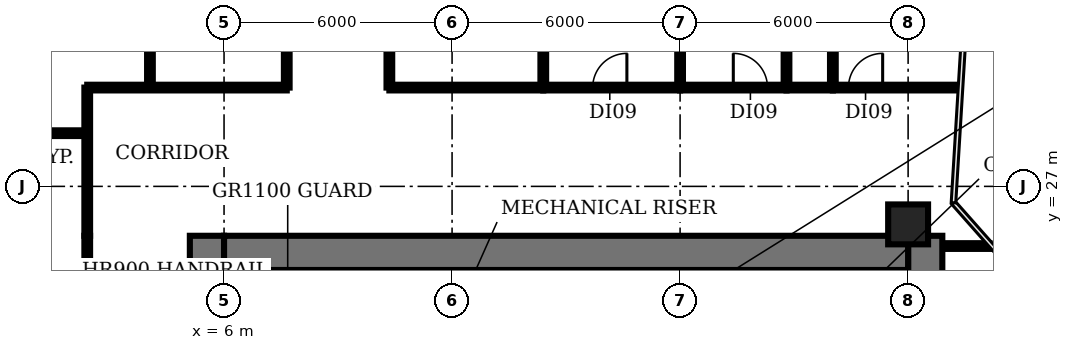
"""IFC4 building model, lengths in metres.
Left out: names, types, materials, properties, quantities, classifications, styles, units other than length and angle.
Written with IfcOpenShell. Run it as: python <this file> out.ifc"""

import sys

from ifc_helpers import new_model, si_unit, direction, frame, frame_2d, origin, origin_2d, place, context, subcontext, project, spatial, rectangle, circle, extrude, element, fill, save


model = new_model("IFC4")
c1 = context("Model", 3, precision=1e-05, world=origin(), true_north=direction((0.0, 1.0)))
c2 = subcontext(c1, "Body", "Model", "MODEL_VIEW")
j1 = project(units=[si_unit("LENGTHUNIT", "METRE"), si_unit("PLANEANGLEUNIT", "RADIAN")], contexts=[c1])
p1 = place(None, origin())
s1 = spatial("IfcSite", under=j1, at=p1, CompositionType="ELEMENT")
p2 = place(p1, origin())
s2 = spatial("IfcBuilding", under=s1, at=p2, CompositionType="ELEMENT")
p3 = place(p2, frame((0.0, 0.0, 37.4)))
s3 = spatial("IfcBuildingStorey", under=s2, at=p3, CompositionType="ELEMENT", Elevation=37.4)
p4 = place(p3, frame((24.0, 26.0, 0.0), z_axis=(0.0, 0.0, 1.0), x_axis=(1.0, 0.0, 0.0)))
e1 = element("IfcColumn", 1, at=p4, inside=s3, PredefinedType="COLUMN", context=c2, shape_type="SweptSolid", body=[
    extrude(circle(Radius=0.525, at=origin_2d()), origin(), (0.0, 0.0, 1.0), 3.85),
])
p5 = place(p3, frame((9.275, 18.375, 0.0), z_axis=(0.0, 0.0, 1.0), x_axis=(0.0, 1.0, 0.0)))
e2 = element("IfcWall", 2, at=p5, inside=s3, PredefinedType="SHEAR", context=c2, shape_type="SweptSolid", body=[
    extrude(rectangle(XDim=6.425, YDim=0.25, at=frame_2d((3.212, 0.0))), origin(), (0.0, 0.0, 1.0), 3.85),
])
for number, where, z_axis, x_axis in (
    (3, (15.1, 22.9, 0.0), (0.0, 0.0, 1.0), (0.0, 1.0, 0.0)),
    (4, (20.7, 22.9, 0.0), (0.0, 0.0, 1.0), (0.0, 1.0, 0.0)),
):
    element("IfcWall", number, at=place(p3, frame(where, z_axis=z_axis, x_axis=x_axis)), inside=s3, PredefinedType="SHEAR", context=c2, shape_type="SweptSolid", body=[
        extrude(rectangle(XDim=1.9, YDim=0.2, at=frame_2d((0.95, 0.0))), origin(), (0.0, 0.0, 1.0), 3.85),
    ])
p6 = place(p3, frame((5.55, 4.5, 0.0), z_axis=(0.0, 0.0, 1.0), x_axis=(0.0, 1.0, 0.0)))
e5 = element("IfcWall", 5, at=p6, inside=s3, PredefinedType="SHEAR", context=c2, shape_type="SweptSolid", body=[
    extrude(rectangle(XDim=21.2, YDim=0.9, at=frame_2d((10.6, 0.0))), origin(), (0.0, 0.0, 1.0), 3.85),
])
p7 = place(p6, frame((1.15, 0.0, 0.0)))
e6 = element("IfcOpeningElement", 6, at=p7, cuts=e5, PredefinedType="OPENING", context=c2, shape_type="SweptSolid", body=[
    extrude(rectangle(XDim=1.5, YDim=2.1, at=frame_2d((0.75, 1.05))), frame((0.0, 0.46, 0.0), z_axis=(0.0, -1.0, 0.0), x_axis=(1.0, 0.0, 0.0)), (0.0, 0.0, 1.0), 0.92),
])
p8 = place(p6, frame((7.6, 0.0, 0.0)))
e7 = element("IfcOpeningElement", 7, at=p8, cuts=e5, PredefinedType="OPENING", context=c2, shape_type="SweptSolid", body=[
    extrude(rectangle(XDim=1.2, YDim=2.1, at=frame_2d((0.6, 1.05))), frame((0.0, 0.46, 0.0), z_axis=(0.0, -1.0, 0.0), x_axis=(1.0, 0.0, 0.0)), (0.0, 0.0, 1.0), 0.92),
])
p9 = place(p6, frame((14.15, 0.0, 0.0)))
e8 = element("IfcOpeningElement", 8, at=p9, cuts=e5, PredefinedType="OPENING", context=c2, shape_type="SweptSolid", body=[
    extrude(rectangle(XDim=1.2, YDim=2.1, at=frame_2d((0.6, 1.05))), frame((0.0, 0.46, 0.0), z_axis=(0.0, -1.0, 0.0), x_axis=(1.0, 0.0, 0.0)), (0.0, 0.0, 1.0), 0.92),
])
p10 = place(p3, frame((24.45, 25.7, 0.0), z_axis=(0.0, 0.0, 1.0), x_axis=(0.0, -1.0, 0.0)))
e9 = element("IfcWall", 9, at=p10, inside=s3, PredefinedType="SHEAR", context=c2, shape_type="SweptSolid", body=[
    extrude(rectangle(XDim=21.2, YDim=0.9, at=frame_2d((10.6, 0.0))), origin(), (0.0, 0.0, 1.0), 3.85),
])
p11 = place(p10, frame((18.55, 0.0, 0.0)))
e10 = element("IfcOpeningElement", 10, at=p11, cuts=e9, PredefinedType="OPENING", context=c2, shape_type="SweptSolid", body=[
    extrude(rectangle(XDim=1.5, YDim=2.1, at=frame_2d((0.75, 1.05))), frame((0.0, 0.46, 0.0), z_axis=(0.0, -1.0, 0.0), x_axis=(1.0, 0.0, 0.0)), (0.0, 0.0, 1.0), 0.92),
])
p12 = place(p10, frame((12.45, 0.0, 0.0)))
e11 = element("IfcOpeningElement", 11, at=p12, cuts=e9, PredefinedType="OPENING", context=c2, shape_type="SweptSolid", body=[
    extrude(rectangle(XDim=0.9, YDim=2.1, at=frame_2d((0.45, 1.05))), frame((0.0, 0.46, 0.0), z_axis=(0.0, -1.0, 0.0), x_axis=(1.0, 0.0, 0.0)), (0.0, 0.0, 1.0), 0.92),
])
p13 = place(p10, frame((6.45, 0.0, 0.0)))
e12 = element("IfcOpeningElement", 12, at=p13, cuts=e9, PredefinedType="OPENING", context=c2, shape_type="SweptSolid", body=[
    extrude(rectangle(XDim=2.0, YDim=2.1, at=frame_2d((1.0, 1.05))), frame((0.0, 0.46, 0.0), z_axis=(0.0, -1.0, 0.0), x_axis=(1.0, 0.0, 0.0)), (0.0, 0.0, 1.0), 0.92),
])
p14 = place(p3, frame((6.0, 25.25, 0.0), z_axis=(0.0, 0.0, 1.0), x_axis=(1.0, 0.0, 0.0)))
e13 = element("IfcWall", 13, at=p14, inside=s3, PredefinedType="SHEAR", context=c2, shape_type="SweptSolid", body=[
    extrude(rectangle(XDim=18.0, YDim=0.9, at=frame_2d((9.0, 0.0))), origin(), (0.0, 0.0, 1.0), 3.85),
])
p15 = place(p3, frame((-1.01, 28.4, 0.0), z_axis=(0.0, 0.0, 1.0), x_axis=(1.0, 0.0, 0.0)))
e14 = element("IfcWall", 14, at=p15, inside=s3, PredefinedType="PARTITIONING", context=c2, shape_type="SweptSolid", body=[
    extrude(rectangle(XDim=3.41, YDim=0.15, at=frame_2d((1.705, 0.0))), origin(), (0.0, 0.0, 1.0), 2.83),
])
p16 = place(p3, frame((2.4, 4.5, 0.0), z_axis=(0.0, 0.0, 1.0), x_axis=(0.0, 1.0, 0.0)))
e15 = element("IfcWall", 15, at=p16, inside=s3, PredefinedType="PARTITIONING", context=c2, shape_type="SweptSolid", body=[
    extrude(rectangle(XDim=21.2, YDim=0.15, at=frame_2d((10.6, 0.0))), origin(), (0.0, 0.0, 1.0), 2.83),
])
p17 = place(p16, frame((10.8, 0.0, 0.0)))
e16 = element("IfcOpeningElement", 16, at=p17, cuts=e15, PredefinedType="OPENING", context=c2, shape_type="SweptSolid", body=[
    extrude(rectangle(XDim=1.2, YDim=2.1, at=frame_2d((0.6, 1.05))), frame((0.0, 0.085, 0.0), z_axis=(0.0, -1.0, 0.0), x_axis=(1.0, 0.0, 0.0)), (0.0, 0.0, 1.0), 0.17),
])
p18 = place(p3, frame((2.4, 25.7, 0.0), z_axis=(0.0, 0.0, 1.0), x_axis=(0.0, 1.0, 0.0)))
e17 = element("IfcWall", 17, at=p18, inside=s3, PredefinedType="PARTITIONING", context=c2, shape_type="SweptSolid", body=[
    extrude(rectangle(XDim=3.9, YDim=0.15, at=frame_2d((1.95, 0.0))), origin(), (0.0, 0.0, 1.0), 2.83),
])
p19 = place(p3, frame((2.4, 29.6, 0.0), z_axis=(0.0, 0.0, 1.0), x_axis=(1.0, 0.0, 0.0)))
e18 = element("IfcWall", 18, at=p19, inside=s3, PredefinedType="PARTITIONING", context=c2, shape_type="SweptSolid", body=[
    extrude(rectangle(XDim=5.25, YDim=0.15, at=frame_2d((2.625, 0.0))), origin(), (0.0, 0.0, 1.0), 2.83),
])
p20 = place(p3, frame((4.05, 29.6, 0.0), z_axis=(0.0, 0.0, 1.0), x_axis=(0.0, 1.0, 0.0)))
e19 = element("IfcWall", 19, at=p20, inside=s3, PredefinedType="PARTITIONING", context=c2, shape_type="SweptSolid", body=[
    extrude(rectangle(XDim=4.8, YDim=0.15, at=frame_2d((2.4, 0.0))), origin(), (0.0, 0.0, 1.0), 2.83),
])
p21 = place(p3, frame((7.65, 29.6, 0.0), z_axis=(0.0, 0.0, 1.0), x_axis=(0.0, 1.0, 0.0)))
e20 = element("IfcWall", 20, at=p21, inside=s3, PredefinedType="PARTITIONING", context=c2, shape_type="SweptSolid", body=[
    extrude(rectangle(XDim=4.8, YDim=0.15, at=frame_2d((2.4, 0.0))), origin(), (0.0, 0.0, 1.0), 2.83),
])
p22 = place(p21, frame((3.7, 0.0, 0.0)))
e21 = element("IfcOpeningElement", 21, at=p22, cuts=e20, PredefinedType="OPENING", context=c2, shape_type="SweptSolid", body=[
    extrude(rectangle(XDim=0.9, YDim=2.1, at=frame_2d((0.45, 1.05))), frame((0.0, 0.085, 0.0), z_axis=(0.0, -1.0, 0.0), x_axis=(1.0, 0.0, 0.0)), (0.0, 0.0, 1.0), 0.17),
])
p23 = place(p3, frame((10.35, 29.6, 0.0), z_axis=(0.0, 0.0, 1.0), x_axis=(0.0, 1.0, 0.0)))
e22 = element("IfcWall", 22, at=p23, inside=s3, PredefinedType="PARTITIONING", context=c2, shape_type="SweptSolid", body=[
    extrude(rectangle(XDim=4.8, YDim=0.15, at=frame_2d((2.4, 0.0))), origin(), (0.0, 0.0, 1.0), 2.83),
])
p24 = place(p3, frame((10.35, 29.6, 0.0), z_axis=(0.0, 0.0, 1.0), x_axis=(1.0, 0.0, 0.0)))
e23 = element("IfcWall", 23, at=p24, inside=s3, PredefinedType="PARTITIONING", context=c2, shape_type="SweptSolid", body=[
    extrude(rectangle(XDim=4.05, YDim=0.15, at=frame_2d((2.025, 0.0))), origin(), (0.0, 0.0, 1.0), 2.83),
])
p25 = place(p3, frame((14.4, 29.6, 0.0), z_axis=(0.0, 0.0, 1.0), x_axis=(0.0, 1.0, 0.0)))
e24 = element("IfcWall", 24, at=p25, inside=s3, PredefinedType="PARTITIONING", context=c2, shape_type="SweptSolid", body=[
    extrude(rectangle(XDim=4.8, YDim=0.15, at=frame_2d((2.4, 0.0))), origin(), (0.0, 0.0, 1.0), 2.83),
])
p26 = place(p3, frame((14.4, 29.6, 0.0), z_axis=(0.0, 0.0, 1.0), x_axis=(1.0, 0.0, 0.0)))
e25 = element("IfcWall", 25, at=p26, inside=s3, PredefinedType="PARTITIONING", context=c2, shape_type="SweptSolid", body=[
    extrude(rectangle(XDim=3.6, YDim=0.15, at=frame_2d((1.8, 0.0))), origin(), (0.0, 0.0, 1.0), 2.83),
])
p27 = place(p26, frame((1.3, 0.0, 0.0)))
e26 = element("IfcOpeningElement", 26, at=p27, cuts=e25, PredefinedType="OPENING", context=c2, shape_type="SweptSolid", body=[
    extrude(rectangle(XDim=0.9, YDim=2.1, at=frame_2d((0.45, 1.05))), frame((0.0, 0.085, 0.0), z_axis=(0.0, -1.0, 0.0), x_axis=(1.0, 0.0, 0.0)), (0.0, 0.0, 1.0), 0.17),
])
p28 = place(p3, frame((18.0, 29.6, 0.0), z_axis=(0.0, 0.0, 1.0), x_axis=(0.0, 1.0, 0.0)))
e27 = element("IfcWall", 27, at=p28, inside=s3, PredefinedType="PARTITIONING", context=c2, shape_type="SweptSolid", body=[
    extrude(rectangle(XDim=4.8, YDim=0.15, at=frame_2d((2.4, 0.0))), origin(), (0.0, 0.0, 1.0), 2.83),
])
p29 = place(p3, frame((18.0, 29.6, 0.0), z_axis=(0.0, 0.0, 1.0), x_axis=(1.0, 0.0, 0.0)))
e28 = element("IfcWall", 28, at=p29, inside=s3, PredefinedType="PARTITIONING", context=c2, shape_type="SweptSolid", body=[
    extrude(rectangle(XDim=2.8, YDim=0.15, at=frame_2d((1.4, 0.0))), origin(), (0.0, 0.0, 1.0), 2.83),
])
p30 = place(p29, frame((1.4, 0.0, 0.0)))
e29 = element("IfcOpeningElement", 29, at=p30, cuts=e28, PredefinedType="OPENING", context=c2, shape_type="SweptSolid", body=[
    extrude(rectangle(XDim=0.9, YDim=2.1, at=frame_2d((0.45, 1.05))), frame((0.0, 0.085, 0.0), z_axis=(0.0, -1.0, 0.0), x_axis=(1.0, 0.0, 0.0)), (0.0, 0.0, 1.0), 0.17),
])
p31 = place(p3, frame((20.8, 29.6, 0.0), z_axis=(0.0, 0.0, 1.0), x_axis=(0.0, 1.0, 0.0)))
e30 = element("IfcWall", 30, at=p31, inside=s3, PredefinedType="PARTITIONING", context=c2, shape_type="SweptSolid", body=[
    extrude(rectangle(XDim=4.8, YDim=0.15, at=frame_2d((2.4, 0.0))), origin(), (0.0, 0.0, 1.0), 2.83),
])
p32 = place(p3, frame((20.8, 29.6, 0.0), z_axis=(0.0, 0.0, 1.0), x_axis=(1.0, 0.0, 0.0)))
e31 = element("IfcWall", 31, at=p32, inside=s3, PredefinedType="PARTITIONING", context=c2, shape_type="SweptSolid", body=[
    extrude(rectangle(XDim=1.22, YDim=0.15, at=frame_2d((0.61, 0.0))), origin(), (0.0, 0.0, 1.0), 2.83),
])
p33 = place(p3, frame((22.02, 29.6, 0.0), z_axis=(0.0, 0.0, 1.0), x_axis=(0.0, 1.0, 0.0)))
e32 = element("IfcWall", 32, at=p33, inside=s3, PredefinedType="PARTITIONING", context=c2, shape_type="SweptSolid", body=[
    extrude(rectangle(XDim=4.8, YDim=0.15, at=frame_2d((2.4, 0.0))), origin(), (0.0, 0.0, 1.0), 2.83),
])
p34 = place(p3, frame((22.02, 29.6, 0.0), z_axis=(0.0, 0.0, 1.0), x_axis=(1.0, 0.0, 0.0)))
e33 = element("IfcWall", 33, at=p34, inside=s3, PredefinedType="PARTITIONING", context=c2, shape_type="SweptSolid", body=[
    extrude(rectangle(XDim=3.31, YDim=0.15, at=frame_2d((1.655, 0.0))), origin(), (0.0, 0.0, 1.0), 2.83),
])
p35 = place(p34, frame((0.41, 0.0, 0.0)))
e34 = element("IfcOpeningElement", 34, at=p35, cuts=e33, PredefinedType="OPENING", context=c2, shape_type="SweptSolid", body=[
    extrude(rectangle(XDim=0.9, YDim=2.1, at=frame_2d((0.45, 1.05))), frame((0.0, 0.085, 0.0), z_axis=(0.0, -1.0, 0.0), x_axis=(1.0, 0.0, 0.0)), (0.0, 0.0, 1.0), 0.17),
])
p36 = place(p3, frame((25.0, 25.43, 0.0), z_axis=(0.0, 0.0, 1.0), x_axis=(1.0, 0.0, 0.0)))
e35 = element("IfcWall", 35, at=p36, inside=s3, PredefinedType="PARTITIONING", context=c2, shape_type="SweptSolid", body=[
    extrude(rectangle(XDim=1.14, YDim=0.15, at=frame_2d((0.57, 0.0))), origin(), (0.0, 0.0, 1.0), 2.83),
])
p37 = place(p27, origin())
e36 = element("IfcDoor", 36, at=p37, inside=s3, OperationType="SINGLE_SWING_RIGHT", PredefinedType="DOOR", context=c2, shape_type="SweptSolid", body=[
    extrude(rectangle(XDim=0.9, YDim=2.1, at=frame_2d((0.45, 1.05))), frame((0.0, 0.025, 0.0), z_axis=(0.0, -1.0, 0.0), x_axis=(1.0, 0.0, 0.0)), (0.0, 0.0, 1.0), 0.05),
])
fill(e26, e36)
p38 = place(p30, origin())
e37 = element("IfcDoor", 37, at=p38, inside=s3, OperationType="SINGLE_SWING_LEFT", PredefinedType="DOOR", context=c2, shape_type="SweptSolid", body=[
    extrude(rectangle(XDim=0.9, YDim=2.1, at=frame_2d((0.45, 1.05))), frame((0.0, 0.025, 0.0), z_axis=(0.0, -1.0, 0.0), x_axis=(1.0, 0.0, 0.0)), (0.0, 0.0, 1.0), 0.05),
])
fill(e29, e37)
p39 = place(p35, origin())
e38 = element("IfcDoor", 38, at=p39, inside=s3, OperationType="SINGLE_SWING_RIGHT", PredefinedType="DOOR", context=c2, shape_type="SweptSolid", body=[
    extrude(rectangle(XDim=0.9, YDim=2.1, at=frame_2d((0.45, 1.05))), frame((0.0, 0.025, 0.0), z_axis=(0.0, -1.0, 0.0), x_axis=(1.0, 0.0, 0.0)), (0.0, 0.0, 1.0), 0.05),
])
fill(e34, e38)
save(model, sys.argv[1])
